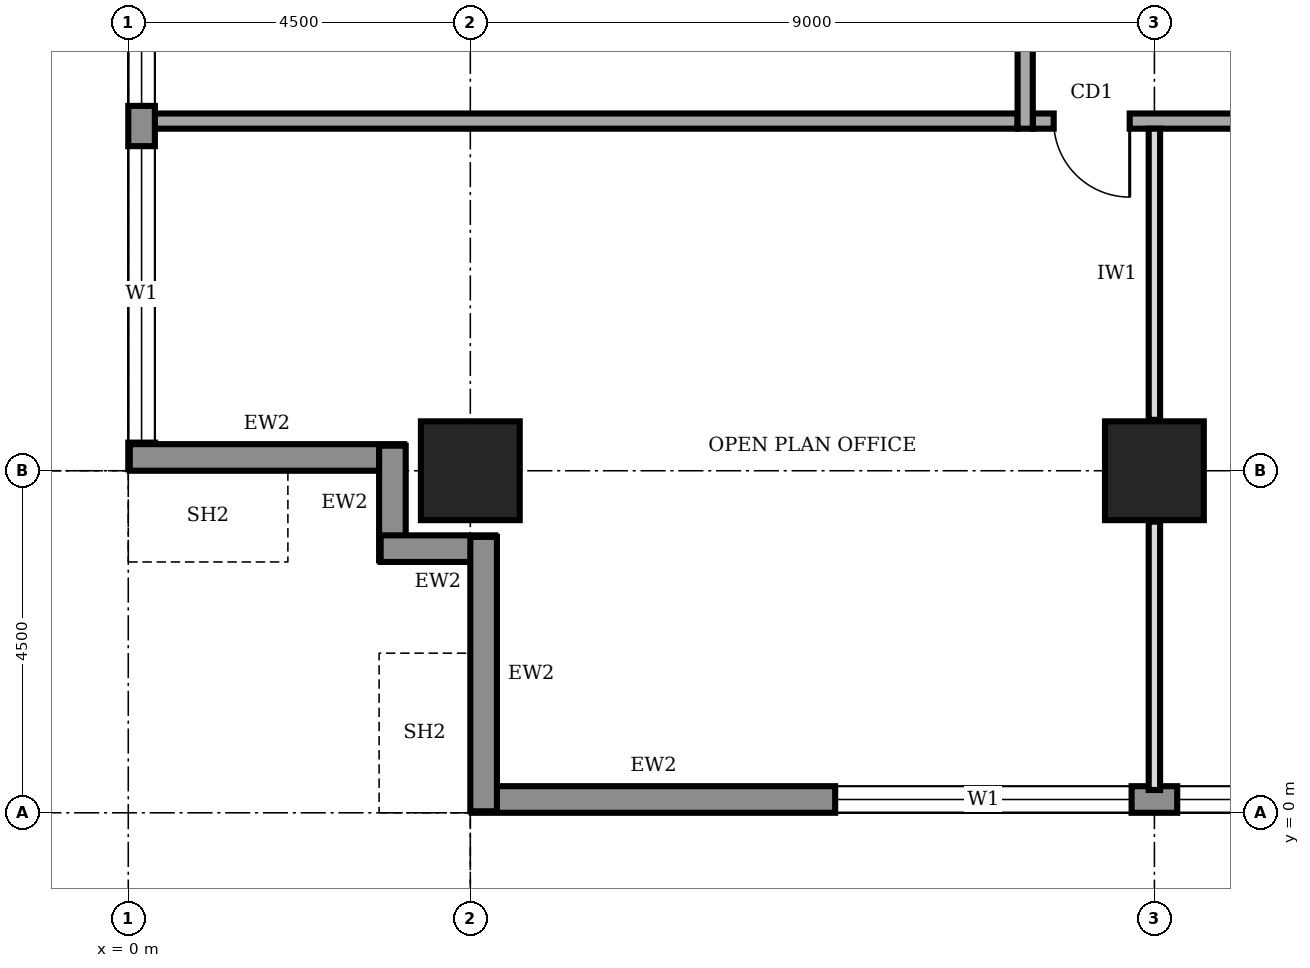
"""IFC4 building model, lengths in metres.
Left out: names, types, materials, properties, quantities, classifications, styles, units other than length and angle.
Written with IfcOpenShell. Run it as: python <this file> out.ifc"""

import sys

from ifc_helpers import new_model, si_unit, direction, frame, frame_2d, origin, origin_2d, place, context, subcontext, project, spatial, rectangle, extrude, element, fill, save


model = new_model("IFC4")
c1 = context("Model", 3, precision=1e-05, world=origin(), true_north=direction((0.0, 1.0)))
c2 = subcontext(c1, "Body", "Model", "MODEL_VIEW")
j1 = project(units=[si_unit("LENGTHUNIT", "METRE"), si_unit("PLANEANGLEUNIT", "RADIAN")], contexts=[c1])
p1 = place(None, origin())
s1 = spatial("IfcSite", under=j1, at=p1, CompositionType="ELEMENT")
p2 = place(p1, origin())
s2 = spatial("IfcBuilding", under=s1, at=p2, CompositionType="ELEMENT")
p3 = place(p2, frame((0.0, 0.0, 273.0)))
s3 = spatial("IfcBuildingStorey", under=s2, at=p3, CompositionType="ELEMENT", Elevation=273.0)
for number, where, z_axis, x_axis in (
    (1, (4.5, 4.5, 0.0), (0.0, 0.0, 1.0), (1.0, 0.0, 0.0)),
    (2, (13.5, 4.5, 0.0), (0.0, 0.0, 1.0), (1.0, 0.0, 0.0)),
):
    element("IfcColumn", number, at=place(p3, frame(where, z_axis=z_axis, x_axis=x_axis)), inside=s3, PredefinedType="COLUMN", context=c2, shape_type="SweptSolid", body=[
        extrude(rectangle(XDim=1.3, YDim=1.3, at=origin_2d()), origin(), (0.0, 0.0, 1.0), 4.0),
    ])
p4 = place(p3, frame((4.52, 0.175, 0.0), z_axis=(0.0, 0.0, 1.0), x_axis=(1.0, 0.0, 0.0)))
e3 = element("IfcWall", 3, at=p4, inside=s3, PredefinedType="STANDARD", context=c2, shape_type="SweptSolid", body=[
    extrude(rectangle(XDim=31.46, YDim=0.35, at=frame_2d((15.73, 0.0))), origin(), (0.0, 0.0, 1.0), 3.75),
])
p5 = place(p4, frame((4.78, 0.0, 0.9)))
e4 = element("IfcOpeningElement", 4, at=p5, cuts=e3, PredefinedType="OPENING", context=c2, shape_type="SweptSolid", body=[
    extrude(rectangle(XDim=3.9, YDim=2.2, at=frame_2d((1.95, 1.1))), frame((0.0, 0.185, 0.0), z_axis=(0.0, -1.0, 0.0), x_axis=(1.0, 0.0, 0.0)), (0.0, 0.0, 1.0), 0.37),
])
p6 = place(p4, frame((9.28, 0.0, 0.9)))
e5 = element("IfcOpeningElement", 5, at=p6, cuts=e3, PredefinedType="OPENING", context=c2, shape_type="SweptSolid", body=[
    extrude(rectangle(XDim=3.9, YDim=2.2, at=frame_2d((1.95, 1.1))), frame((0.0, 0.185, 0.0), z_axis=(0.0, -1.0, 0.0), x_axis=(1.0, 0.0, 0.0)), (0.0, 0.0, 1.0), 0.37),
])
p7 = place(p4, frame((13.78, 0.0, 0.9)))
e6 = element("IfcOpeningElement", 6, at=p7, cuts=e3, PredefinedType="OPENING", context=c2, shape_type="SweptSolid", body=[
    extrude(rectangle(XDim=3.9, YDim=2.2, at=frame_2d((1.95, 1.1))), frame((0.0, 0.185, 0.0), z_axis=(0.0, -1.0, 0.0), x_axis=(1.0, 0.0, 0.0)), (0.0, 0.0, 1.0), 0.37),
])
p8 = place(p4, frame((18.28, 0.0, 0.9)))
e7 = element("IfcOpeningElement", 7, at=p8, cuts=e3, PredefinedType="OPENING", context=c2, shape_type="SweptSolid", body=[
    extrude(rectangle(XDim=3.9, YDim=2.2, at=frame_2d((1.95, 1.1))), frame((0.0, 0.185, 0.0), z_axis=(0.0, -1.0, 0.0), x_axis=(1.0, 0.0, 0.0)), (0.0, 0.0, 1.0), 0.37),
])
p9 = place(p4, frame((22.78, 0.0, 0.9)))
e8 = element("IfcOpeningElement", 8, at=p9, cuts=e3, PredefinedType="OPENING", context=c2, shape_type="SweptSolid", body=[
    extrude(rectangle(XDim=3.9, YDim=2.2, at=frame_2d((1.95, 1.1))), frame((0.0, 0.185, 0.0), z_axis=(0.0, -1.0, 0.0), x_axis=(1.0, 0.0, 0.0)), (0.0, 0.0, 1.0), 0.37),
])
p10 = place(p4, frame((27.21, 0.0, 0.9)))
e9 = element("IfcOpeningElement", 9, at=p10, cuts=e3, PredefinedType="OPENING", context=c2, shape_type="SweptSolid", body=[
    extrude(rectangle(XDim=3.9, YDim=2.2, at=frame_2d((1.95, 1.1))), frame((0.0, 0.185, 0.0), z_axis=(0.0, -1.0, 0.0), x_axis=(1.0, 0.0, 0.0)), (0.0, 0.0, 1.0), 0.37),
])
p11 = place(p3, frame((0.175, 35.98, 0.0), z_axis=(0.0, 0.0, 1.0), x_axis=(0.0, -1.0, 0.0)))
e10 = element("IfcWall", 10, at=p11, inside=s3, PredefinedType="STANDARD", context=c2, shape_type="SweptSolid", body=[
    extrude(rectangle(XDim=31.46, YDim=0.35, at=frame_2d((15.73, 0.0))), origin(), (0.0, 0.0, 1.0), 3.75),
])
p12 = place(p11, frame((27.21, 0.0, 0.9)))
e11 = element("IfcOpeningElement", 11, at=p12, cuts=e10, PredefinedType="OPENING", context=c2, shape_type="SweptSolid", body=[
    extrude(rectangle(XDim=3.9, YDim=2.2, at=frame_2d((1.95, 1.1))), frame((0.0, 0.185, 0.0), z_axis=(0.0, -1.0, 0.0), x_axis=(1.0, 0.0, 0.0)), (0.0, 0.0, 1.0), 0.37),
])
p13 = place(p11, frame((22.78, 0.0, 0.9)))
e12 = element("IfcOpeningElement", 12, at=p13, cuts=e10, PredefinedType="OPENING", context=c2, shape_type="SweptSolid", body=[
    extrude(rectangle(XDim=3.9, YDim=2.2, at=frame_2d((1.95, 1.1))), frame((0.0, 0.185, 0.0), z_axis=(0.0, -1.0, 0.0), x_axis=(1.0, 0.0, 0.0)), (0.0, 0.0, 1.0), 0.37),
])
p14 = place(p11, frame((18.28, 0.0, 0.9)))
e13 = element("IfcOpeningElement", 13, at=p14, cuts=e10, PredefinedType="OPENING", context=c2, shape_type="SweptSolid", body=[
    extrude(rectangle(XDim=3.9, YDim=2.2, at=frame_2d((1.95, 1.1))), frame((0.0, 0.185, 0.0), z_axis=(0.0, -1.0, 0.0), x_axis=(1.0, 0.0, 0.0)), (0.0, 0.0, 1.0), 0.37),
])
p15 = place(p11, frame((13.78, 0.0, 0.9)))
e14 = element("IfcOpeningElement", 14, at=p15, cuts=e10, PredefinedType="OPENING", context=c2, shape_type="SweptSolid", body=[
    extrude(rectangle(XDim=3.9, YDim=2.2, at=frame_2d((1.95, 1.1))), frame((0.0, 0.185, 0.0), z_axis=(0.0, -1.0, 0.0), x_axis=(1.0, 0.0, 0.0)), (0.0, 0.0, 1.0), 0.37),
])
p16 = place(p11, frame((9.28, 0.0, 0.9)))
e15 = element("IfcOpeningElement", 15, at=p16, cuts=e10, PredefinedType="OPENING", context=c2, shape_type="SweptSolid", body=[
    extrude(rectangle(XDim=3.9, YDim=2.2, at=frame_2d((1.95, 1.1))), frame((0.0, 0.185, 0.0), z_axis=(0.0, -1.0, 0.0), x_axis=(1.0, 0.0, 0.0)), (0.0, 0.0, 1.0), 0.37),
])
p17 = place(p11, frame((4.78, 0.0, 0.9)))
e16 = element("IfcOpeningElement", 16, at=p17, cuts=e10, PredefinedType="OPENING", context=c2, shape_type="SweptSolid", body=[
    extrude(rectangle(XDim=3.9, YDim=2.2, at=frame_2d((1.95, 1.1))), frame((0.0, 0.185, 0.0), z_axis=(0.0, -1.0, 0.0), x_axis=(1.0, 0.0, 0.0)), (0.0, 0.0, 1.0), 0.37),
])
p18 = place(p3, frame((0.02, 4.675, 0.0), z_axis=(0.0, 0.0, 1.0), x_axis=(1.0, 0.0, 0.0)))
e17 = element("IfcWall", 17, at=p18, inside=s3, PredefinedType="STANDARD", context=c2, shape_type="SweptSolid", body=[
    extrude(rectangle(XDim=3.61, YDim=0.35, at=frame_2d((1.805, 0.0))), origin(), (0.0, 0.0, 1.0), 2.85),
])
for number, where, z_axis, x_axis in (
    (18, (3.475, 4.83, 0.0), (0.0, 0.0, 1.0), (0.0, -1.0, 0.0)),
    (19, (3.32, 3.475, 0.0), (0.0, 0.0, 1.0), (1.0, 0.0, 0.0)),
):
    element("IfcWall", number, at=place(p3, frame(where, z_axis=z_axis, x_axis=x_axis)), inside=s3, PredefinedType="STANDARD", context=c2, shape_type="SweptSolid", body=[
        extrude(rectangle(XDim=1.51, YDim=0.35, at=frame_2d((0.755, 0.0))), origin(), (0.0, 0.0, 1.0), 3.75),
    ])
p19 = place(p3, frame((4.675, 3.63, 0.0), z_axis=(0.0, 0.0, 1.0), x_axis=(0.0, -1.0, 0.0)))
e20 = element("IfcWall", 20, at=p19, inside=s3, PredefinedType="STANDARD", context=c2, shape_type="SweptSolid", body=[
    extrude(rectangle(XDim=3.61, YDim=0.35, at=frame_2d((1.805, 0.0))), origin(), (0.0, 0.0, 1.0), 2.85),
])
p20 = place(p3, frame((11.9, 9.1, 0.0), z_axis=(0.0, 0.0, 1.0), x_axis=(1.0, 0.0, 0.0)))
e21 = element("IfcWall", 21, at=p20, inside=s3, PredefinedType="SOLIDWALL", context=c2, shape_type="SweptSolid", body=[
    extrude(rectangle(XDim=16.9, YDim=0.2, at=frame_2d((8.45, 0.0))), origin(), (0.0, 0.0, 1.0), 3.75),
])
p21 = place(p20, frame((0.275, 0.0, 0.0)))
e22 = element("IfcOpeningElement", 22, at=p21, cuts=e21, PredefinedType="OPENING", context=c2, shape_type="SweptSolid", body=[
    extrude(rectangle(XDim=1.0, YDim=2.1, at=frame_2d((0.5, 1.05))), frame((0.0, 0.11, 0.0), z_axis=(0.0, -1.0, 0.0), x_axis=(1.0, 0.0, 0.0)), (0.0, 0.0, 1.0), 0.22),
])
p22 = place(p20, frame((8.35, 0.0, 0.0)))
e23 = element("IfcOpeningElement", 23, at=p22, cuts=e21, PredefinedType="OPENING", context=c2, shape_type="SweptSolid", body=[
    extrude(rectangle(XDim=1.8, YDim=2.1, at=frame_2d((0.9, 1.05))), frame((0.0, 0.11, 0.0), z_axis=(0.0, -1.0, 0.0), x_axis=(1.0, 0.0, 0.0)), (0.0, 0.0, 1.0), 0.22),
])
p23 = place(p3, frame((11.8, 32.8, 0.0), z_axis=(0.0, 0.0, 1.0), x_axis=(0.0, -1.0, 0.0)))
e24 = element("IfcWall", 24, at=p23, inside=s3, PredefinedType="SOLIDWALL", context=c2, shape_type="SweptSolid", body=[
    extrude(rectangle(XDim=23.8, YDim=0.2, at=frame_2d((11.9, 0.0))), origin(), (0.0, 0.0, 1.0), 3.75),
])
p24 = place(p23, frame((21.05, 0.0, 0.0)))
e25 = element("IfcOpeningElement", 25, at=p24, cuts=e24, PredefinedType="OPENING", context=c2, shape_type="SweptSolid", body=[
    extrude(rectangle(XDim=1.0, YDim=2.1, at=frame_2d((0.5, 1.05))), frame((0.0, 0.11, 0.0), z_axis=(0.0, -1.0, 0.0), x_axis=(1.0, 0.0, 0.0)), (0.0, 0.0, 1.0), 0.22),
])
p25 = place(p23, frame((16.95, 0.0, 0.0)))
e26 = element("IfcOpeningElement", 26, at=p25, cuts=e24, PredefinedType="OPENING", context=c2, shape_type="SweptSolid", body=[
    extrude(rectangle(XDim=0.9, YDim=2.1, at=frame_2d((0.45, 1.05))), frame((0.0, 0.11, 0.0), z_axis=(0.0, -1.0, 0.0), x_axis=(1.0, 0.0, 0.0)), (0.0, 0.0, 1.0), 0.22),
])
p26 = place(p23, frame((13.95, 0.0, 0.0)))
e27 = element("IfcOpeningElement", 27, at=p26, cuts=e24, PredefinedType="OPENING", context=c2, shape_type="SweptSolid", body=[
    extrude(rectangle(XDim=0.9, YDim=2.1, at=frame_2d((0.45, 1.05))), frame((0.0, 0.11, 0.0), z_axis=(0.0, -1.0, 0.0), x_axis=(1.0, 0.0, 0.0)), (0.0, 0.0, 1.0), 0.22),
])
p27 = place(p23, frame((9.1, 0.0, 0.0)))
e28 = element("IfcOpeningElement", 28, at=p27, cuts=e24, PredefinedType="OPENING", context=c2, shape_type="SweptSolid", body=[
    extrude(rectangle(XDim=0.9, YDim=2.1, at=frame_2d((0.45, 1.05))), frame((0.0, 0.11, 0.0), z_axis=(0.0, -1.0, 0.0), x_axis=(1.0, 0.0, 0.0)), (0.0, 0.0, 1.0), 0.22),
])
p28 = place(p23, frame((6.3, 0.0, 0.0)))
e29 = element("IfcOpeningElement", 29, at=p28, cuts=e24, PredefinedType="OPENING", context=c2, shape_type="SweptSolid", body=[
    extrude(rectangle(XDim=1.0, YDim=2.1, at=frame_2d((0.5, 1.05))), frame((0.0, 0.11, 0.0), z_axis=(0.0, -1.0, 0.0), x_axis=(1.0, 0.0, 0.0)), (0.0, 0.0, 1.0), 0.22),
])
p29 = place(p23, frame((11.8, 0.0, 0.0)))
e30 = element("IfcOpeningElement", 30, at=p29, cuts=e24, PredefinedType="OPENING", context=c2, shape_type="SweptSolid", body=[
    extrude(rectangle(XDim=1.0, YDim=2.1, at=frame_2d((0.5, 1.05))), frame((0.0, 0.11, 0.0), z_axis=(0.0, -1.0, 0.0), x_axis=(1.0, 0.0, 0.0)), (0.0, 0.0, 1.0), 0.22),
])
p30 = place(p23, frame((2.3, 0.0, 0.0)))
e31 = element("IfcOpeningElement", 31, at=p30, cuts=e24, PredefinedType="OPENING", context=c2, shape_type="SweptSolid", body=[
    extrude(rectangle(XDim=1.0, YDim=2.1, at=frame_2d((0.5, 1.05))), frame((0.0, 0.11, 0.0), z_axis=(0.0, -1.0, 0.0), x_axis=(1.0, 0.0, 0.0)), (0.0, 0.0, 1.0), 0.22),
])
p31 = place(p3, frame((0.3, 9.1, 0.0), z_axis=(0.0, 0.0, 1.0), x_axis=(1.0, 0.0, 0.0)))
e32 = element("IfcWall", 32, at=p31, inside=s3, PredefinedType="SOLIDWALL", context=c2, shape_type="SweptSolid", body=[
    extrude(rectangle(XDim=11.4, YDim=0.2, at=frame_2d((5.7, 0.0))), origin(), (0.0, 0.0, 1.0), 3.75),
])
p32 = place(p3, frame((13.5, 0.3, 0.0), z_axis=(0.0, 0.0, 1.0), x_axis=(0.0, 1.0, 0.0)))
e33 = element("IfcWall", 33, at=p32, inside=s3, PredefinedType="PARTITIONING", context=c2, shape_type="SweptSolid", body=[
    extrude(rectangle(XDim=3.53, YDim=0.15, at=frame_2d((1.765, 0.0))), origin(), (0.0, 0.0, 1.0), 2.85),
])
p33 = place(p3, frame((13.5, 5.17, 0.0), z_axis=(0.0, 0.0, 1.0), x_axis=(0.0, 1.0, 0.0)))
e34 = element("IfcWall", 34, at=p33, inside=s3, PredefinedType="PARTITIONING", context=c2, shape_type="SweptSolid", body=[
    extrude(rectangle(XDim=3.83, YDim=0.15, at=frame_2d((1.915, 0.0))), origin(), (0.0, 0.0, 1.0), 2.85),
])
p34 = place(p5, origin())
e35 = element("IfcWindow", 35, at=p34, inside=s3, PartitioningType="SINGLE_PANEL", PredefinedType="WINDOW", context=c2, shape_type="SweptSolid", body=[
    extrude(rectangle(XDim=3.9, YDim=2.2, at=frame_2d((1.95, 1.1))), frame((0.0, 0.03, 0.0), z_axis=(0.0, -1.0, 0.0), x_axis=(1.0, 0.0, 0.0)), (0.0, 0.0, 1.0), 0.06),
])
fill(e4, e35)
p35 = place(p6, origin())
e36 = element("IfcWindow", 36, at=p35, inside=s3, PartitioningType="SINGLE_PANEL", PredefinedType="WINDOW", context=c2, shape_type="SweptSolid", body=[
    extrude(rectangle(XDim=3.9, YDim=2.2, at=frame_2d((1.95, 1.1))), frame((0.0, 0.03, 0.0), z_axis=(0.0, -1.0, 0.0), x_axis=(1.0, 0.0, 0.0)), (0.0, 0.0, 1.0), 0.06),
])
fill(e5, e36)
p36 = place(p12, origin())
e37 = element("IfcWindow", 37, at=p36, inside=s3, PartitioningType="SINGLE_PANEL", PredefinedType="WINDOW", context=c2, shape_type="SweptSolid", body=[
    extrude(rectangle(XDim=3.9, YDim=2.2, at=frame_2d((1.95, 1.1))), frame((0.0, 0.03, 0.0), z_axis=(0.0, -1.0, 0.0), x_axis=(1.0, 0.0, 0.0)), (0.0, 0.0, 1.0), 0.06),
])
fill(e11, e37)
p37 = place(p13, origin())
e38 = element("IfcWindow", 38, at=p37, inside=s3, PartitioningType="SINGLE_PANEL", PredefinedType="WINDOW", context=c2, shape_type="SweptSolid", body=[
    extrude(rectangle(XDim=3.9, YDim=2.2, at=frame_2d((1.95, 1.1))), frame((0.0, 0.03, 0.0), z_axis=(0.0, -1.0, 0.0), x_axis=(1.0, 0.0, 0.0)), (0.0, 0.0, 1.0), 0.06),
])
fill(e12, e38)
p38 = place(p21, frame((1.0, 0.0, 0.0), z_axis=(0.0, 0.0, 1.0), x_axis=(-1.0, 0.0, 0.0)))
e39 = element("IfcDoor", 39, at=p38, inside=s3, OperationType="SINGLE_SWING_LEFT", PredefinedType="DOOR", context=c2, shape_type="SweptSolid", body=[
    extrude(rectangle(XDim=1.0, YDim=2.1, at=frame_2d((0.5, 1.05))), frame((0.0, 0.025, 0.0), z_axis=(0.0, -1.0, 0.0), x_axis=(1.0, 0.0, 0.0)), (0.0, 0.0, 1.0), 0.05),
])
fill(e22, e39)
save(model, sys.argv[1])
